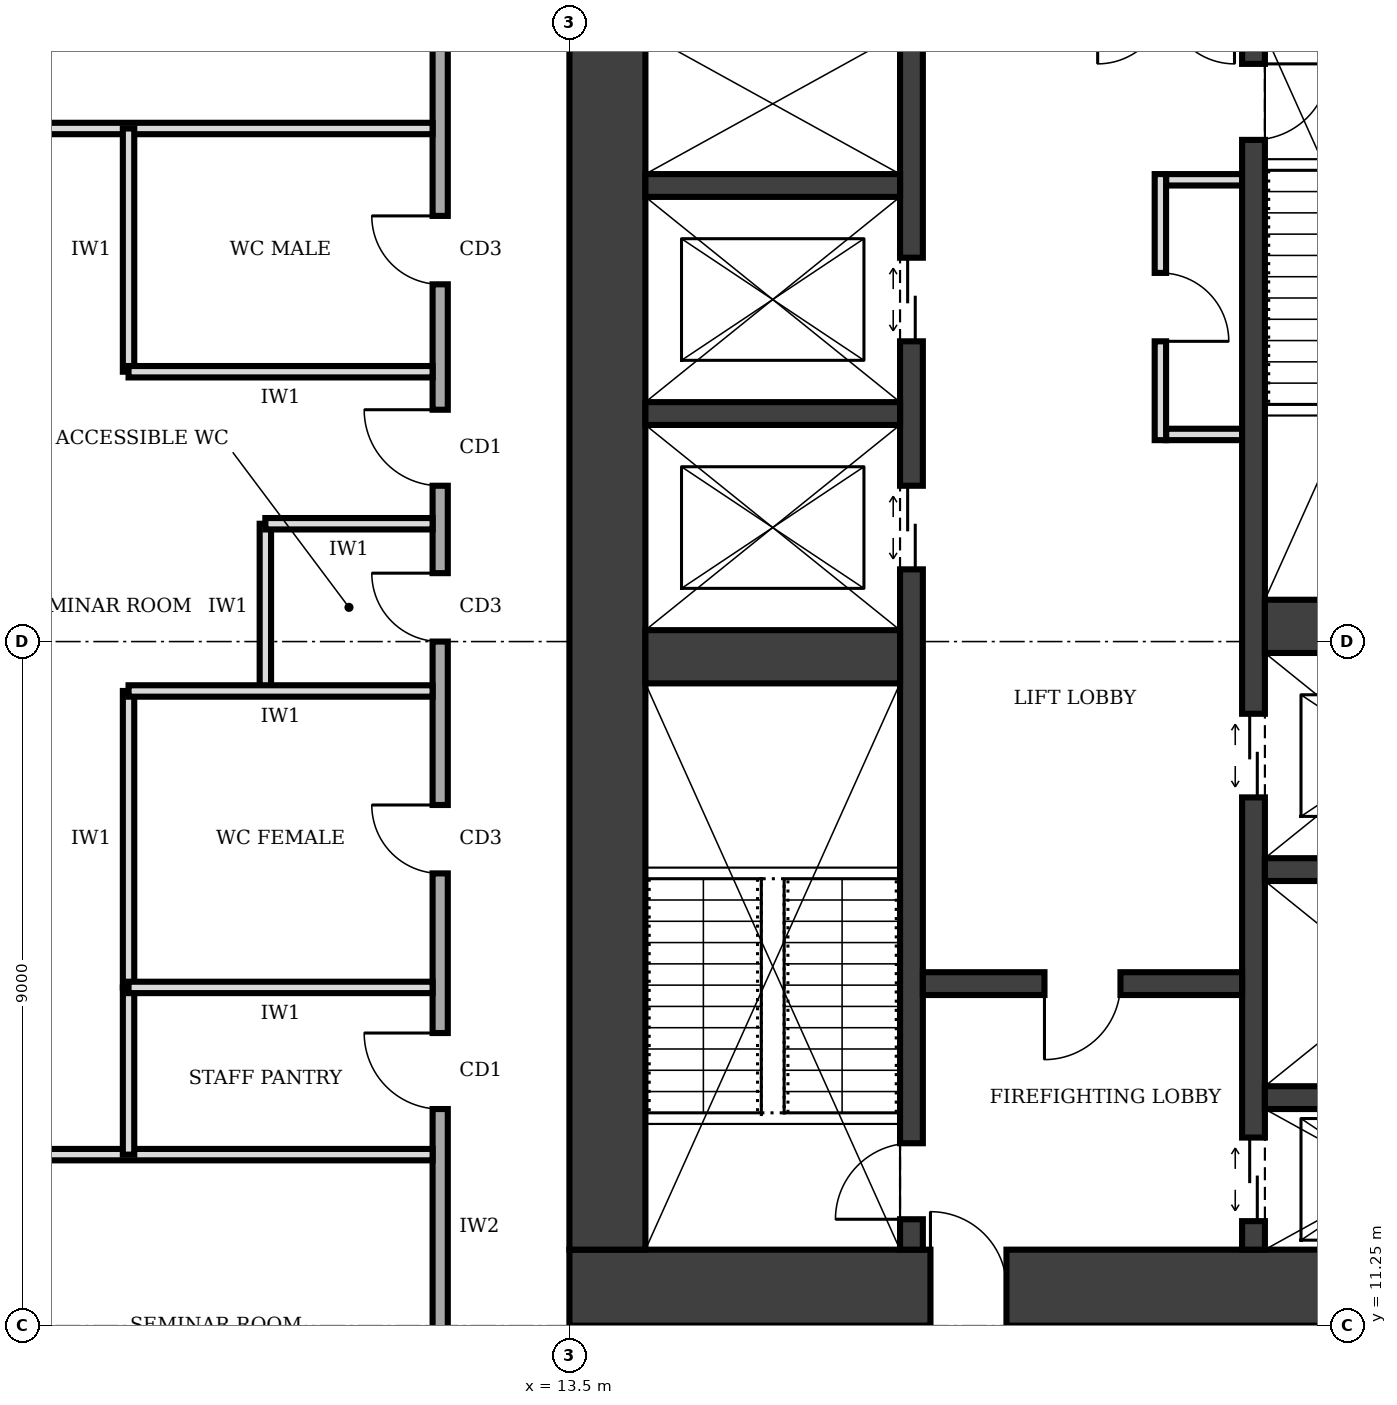
"""IFC4 building model, lengths in metres.
Left out: names, types, materials, properties, quantities, classifications, styles, units other than length and angle.
Written with IfcOpenShell. Run it as: python <this file> out.ifc"""

import sys

from ifc_helpers import new_model, si_unit, direction, frame, frame_2d, origin, place, context, subcontext, project, spatial, rectangle, extrude, element, fill, save


model = new_model("IFC4")
c1 = context("Model", 3, precision=1e-05, world=origin(), true_north=direction((0.0, 1.0)))
c2 = subcontext(c1, "Body", "Model", "MODEL_VIEW")
j1 = project(units=[si_unit("LENGTHUNIT", "METRE"), si_unit("PLANEANGLEUNIT", "RADIAN")], contexts=[c1])
p1 = place(None, origin())
s1 = spatial("IfcSite", under=j1, at=p1, CompositionType="ELEMENT")
p2 = place(p1, origin())
s2 = spatial("IfcBuilding", under=s1, at=p2, CompositionType="ELEMENT")
p3 = place(p2, frame((0.0, 0.0, 29.0)))
s3 = spatial("IfcBuildingStorey", under=s2, at=p3, CompositionType="ELEMENT", Elevation=29.0)
p4 = place(p3, frame((13.5, 11.75, 0.0), z_axis=(0.0, 0.0, 1.0), x_axis=(1.0, 0.0, 0.0)))
e1 = element("IfcWall", 1, at=p4, inside=s3, PredefinedType="SHEAR", context=c2, shape_type="SweptSolid", body=[
    extrude(rectangle(XDim=13.5, YDim=1.0, at=frame_2d((6.75, 0.0))), origin(), (0.0, 0.0, 1.0), 4.0),
])
p5 = place(p4, frame((4.75, 0.0, 0.0)))
e2 = element("IfcOpeningElement", 2, at=p5, cuts=e1, PredefinedType="OPENING", context=c2, shape_type="SweptSolid", body=[
    extrude(rectangle(XDim=1.0, YDim=2.1, at=frame_2d((0.5, 1.05))), frame((0.0, 0.51, 0.0), z_axis=(0.0, -1.0, 0.0), x_axis=(1.0, 0.0, 0.0)), (0.0, 0.0, 1.0), 1.02),
])
p6 = place(p3, frame((14.0, 28.25, 0.0), z_axis=(0.0, 0.0, 1.0), x_axis=(0.0, -1.0, 0.0)))
e3 = element("IfcWall", 3, at=p6, inside=s3, PredefinedType="SHEAR", context=c2, shape_type="SweptSolid", body=[
    extrude(rectangle(XDim=16.0, YDim=1.0, at=frame_2d((8.0, 0.0))), origin(), (0.0, 0.0, 1.0), 4.0),
])
p7 = place(p3, frame((18.0, 12.25, 0.0), z_axis=(0.0, 0.0, 1.0), x_axis=(0.0, 1.0, 0.0)))
e4 = element("IfcWall", 4, at=p7, inside=s3, PredefinedType="SHEAR", context=c2, shape_type="SweptSolid", body=[
    extrude(rectangle(XDim=16.0, YDim=0.3, at=frame_2d((8.0, 0.0))), origin(), (0.0, 0.0, 1.0), 4.0),
])
p8 = place(p7, frame((0.4, 0.0, 0.0)))
e5 = element("IfcOpeningElement", 5, at=p8, cuts=e4, PredefinedType="OPENING", context=c2, shape_type="SweptSolid", body=[
    extrude(rectangle(XDim=1.0, YDim=2.1, at=frame_2d((0.5, 1.05))), frame((0.0, 0.16, 0.0), z_axis=(0.0, -1.0, 0.0), x_axis=(1.0, 0.0, 0.0)), (0.0, 0.0, 1.0), 0.32),
])
p9 = place(p7, frame((8.95, 0.0, 0.0)))
e6 = element("IfcOpeningElement", 6, at=p9, cuts=e4, PredefinedType="OPENING", context=c2, shape_type="SweptSolid", body=[
    extrude(rectangle(XDim=1.1, YDim=2.1, at=frame_2d((0.55, 1.05))), frame((0.0, 0.16, 0.0), z_axis=(0.0, -1.0, 0.0), x_axis=(1.0, 0.0, 0.0)), (0.0, 0.0, 1.0), 0.32),
])
p10 = place(p7, frame((11.95, 0.0, 0.0)))
e7 = element("IfcOpeningElement", 7, at=p10, cuts=e4, PredefinedType="OPENING", context=c2, shape_type="SweptSolid", body=[
    extrude(rectangle(XDim=1.1, YDim=2.1, at=frame_2d((0.55, 1.05))), frame((0.0, 0.16, 0.0), z_axis=(0.0, -1.0, 0.0), x_axis=(1.0, 0.0, 0.0)), (0.0, 0.0, 1.0), 0.32),
])
p11 = place(p3, frame((22.5, 12.25, 0.0), z_axis=(0.0, 0.0, 1.0), x_axis=(0.0, 1.0, 0.0)))
e8 = element("IfcWall", 8, at=p11, inside=s3, PredefinedType="SHEAR", context=c2, shape_type="SweptSolid", body=[
    extrude(rectangle(XDim=16.0, YDim=0.3, at=frame_2d((8.0, 0.0))), origin(), (0.0, 0.0, 1.0), 4.0),
])
p12 = place(p11, frame((14.6, 0.0, 0.0)))
e9 = element("IfcOpeningElement", 9, at=p12, cuts=e8, PredefinedType="OPENING", context=c2, shape_type="SweptSolid", body=[
    extrude(rectangle(XDim=1.0, YDim=2.1, at=frame_2d((0.5, 1.05))), frame((0.0, 0.16, 0.0), z_axis=(0.0, -1.0, 0.0), x_axis=(1.0, 0.0, 0.0)), (0.0, 0.0, 1.0), 0.32),
])
p13 = place(p11, frame((0.375, 0.0, 0.0)))
e10 = element("IfcOpeningElement", 10, at=p13, cuts=e8, PredefinedType="OPENING", context=c2, shape_type="SweptSolid", body=[
    extrude(rectangle(XDim=1.1, YDim=2.1, at=frame_2d((0.55, 1.05))), frame((0.0, 0.16, 0.0), z_axis=(0.0, -1.0, 0.0), x_axis=(1.0, 0.0, 0.0)), (0.0, 0.0, 1.0), 0.32),
])
p14 = place(p11, frame((5.95, 0.0, 0.0)))
e11 = element("IfcOpeningElement", 11, at=p14, cuts=e8, PredefinedType="OPENING", context=c2, shape_type="SweptSolid", body=[
    extrude(rectangle(XDim=1.1, YDim=2.1, at=frame_2d((0.55, 1.05))), frame((0.0, 0.16, 0.0), z_axis=(0.0, -1.0, 0.0), x_axis=(1.0, 0.0, 0.0)), (0.0, 0.0, 1.0), 0.32),
])
p15 = place(p3, frame((14.5, 20.05, 0.0), z_axis=(0.0, 0.0, 1.0), x_axis=(1.0, 0.0, 0.0)))
e12 = element("IfcWall", 12, at=p15, inside=s3, PredefinedType="SHEAR", context=c2, shape_type="SweptSolid", body=[
    extrude(rectangle(XDim=3.35, YDim=0.7, at=frame_2d((1.675, 0.0))), origin(), (0.0, 0.0, 1.0), 4.0),
])
p16 = place(p3, frame((18.15, 15.75, 0.0), z_axis=(0.0, 0.0, 1.0), x_axis=(1.0, 0.0, 0.0)))
e13 = element("IfcWall", 13, at=p16, inside=s3, PredefinedType="SHEAR", context=c2, shape_type="SweptSolid", body=[
    extrude(rectangle(XDim=4.2, YDim=0.3, at=frame_2d((2.1, 0.0))), origin(), (0.0, 0.0, 1.0), 4.0),
])
p17 = place(p16, frame((1.6, 0.0, 0.0)))
e14 = element("IfcOpeningElement", 14, at=p17, cuts=e13, PredefinedType="OPENING", context=c2, shape_type="SweptSolid", body=[
    extrude(rectangle(XDim=1.0, YDim=2.1, at=frame_2d((0.5, 1.05))), frame((0.0, 0.16, 0.0), z_axis=(0.0, -1.0, 0.0), x_axis=(1.0, 0.0, 0.0)), (0.0, 0.0, 1.0), 0.32),
])
for number, where, z_axis, x_axis in (
    (15, (22.65, 14.25, 0.0), (0.0, 0.0, 1.0), (1.0, 0.0, 0.0)),
    (16, (22.65, 17.25, 0.0), (0.0, 0.0, 1.0), (1.0, 0.0, 0.0)),
):
    element("IfcWall", number, at=place(p3, frame(where, z_axis=z_axis, x_axis=x_axis)), inside=s3, PredefinedType="SHEAR", context=c2, shape_type="SweptSolid", body=[
        extrude(rectangle(XDim=3.35, YDim=0.3, at=frame_2d((1.675, 0.0))), origin(), (0.0, 0.0, 1.0), 4.0),
    ])
p18 = place(p3, frame((22.65, 20.45, 0.0), z_axis=(0.0, 0.0, 1.0), x_axis=(1.0, 0.0, 0.0)))
e17 = element("IfcWall", 17, at=p18, inside=s3, PredefinedType="SHEAR", context=c2, shape_type="SweptSolid", body=[
    extrude(rectangle(XDim=3.35, YDim=0.7, at=frame_2d((1.675, 0.0))), origin(), (0.0, 0.0, 1.0), 4.0),
])
for number, where, z_axis, x_axis in (
    (18, (14.5, 23.25, 0.0), (0.0, 0.0, 1.0), (1.0, 0.0, 0.0)),
    (19, (14.5, 26.25, 0.0), (0.0, 0.0, 1.0), (1.0, 0.0, 0.0)),
):
    element("IfcWall", number, at=place(p3, frame(where, z_axis=z_axis, x_axis=x_axis)), inside=s3, PredefinedType="SHEAR", context=c2, shape_type="SweptSolid", body=[
        extrude(rectangle(XDim=3.35, YDim=0.3, at=frame_2d((1.675, 0.0))), origin(), (0.0, 0.0, 1.0), 4.0),
    ])
p19 = place(p3, frame((21.275, 22.9, 0.0), z_axis=(0.0, 0.0, 1.0), x_axis=(0.0, 1.0, 0.0)))
e20 = element("IfcWall", 20, at=p19, inside=s3, PredefinedType="PARTITIONING", context=c2, shape_type="SweptSolid", body=[
    extrude(rectangle(XDim=3.5, YDim=0.15, at=frame_2d((1.75, 0.0))), origin(), (0.0, 0.0, 1.0), 3.75),
])
p20 = place(p19, frame((1.3, 0.0, 0.0)))
e21 = element("IfcOpeningElement", 21, at=p20, cuts=e20, PredefinedType="OPENING", context=c2, shape_type="SweptSolid", body=[
    extrude(rectangle(XDim=0.9, YDim=2.1, at=frame_2d((0.45, 1.05))), frame((0.0, 0.085, 0.0), z_axis=(0.0, -1.0, 0.0), x_axis=(1.0, 0.0, 0.0)), (0.0, 0.0, 1.0), 0.17),
])
for number, where, z_axis, x_axis in (
    (22, (21.35, 22.975, 0.0), (0.0, 0.0, 1.0), (1.0, 0.0, 0.0)),
    (23, (21.35, 26.325, 0.0), (0.0, 0.0, 1.0), (1.0, 0.0, 0.0)),
):
    element("IfcWall", number, at=place(p3, frame(where, z_axis=z_axis, x_axis=x_axis)), inside=s3, PredefinedType="PARTITIONING", context=c2, shape_type="SweptSolid", body=[
        extrude(rectangle(XDim=1.0, YDim=0.15, at=frame_2d((0.5, 0.0))), origin(), (0.0, 0.0, 1.0), 3.75),
    ])
p21 = place(p3, frame((11.8, 31.3, 0.0), z_axis=(0.0, 0.0, 1.0), x_axis=(0.0, -1.0, 0.0)))
e24 = element("IfcWall", 24, at=p21, inside=s3, PredefinedType="SOLIDWALL", context=c2, shape_type="SweptSolid", body=[
    extrude(rectangle(XDim=23.8, YDim=0.2, at=frame_2d((11.9, 0.0))), origin(), (0.0, 0.0, 1.0), 3.75),
])
p22 = place(p21, frame((20.3, 0.0, 0.0)))
e25 = element("IfcOpeningElement", 25, at=p22, cuts=e24, PredefinedType="OPENING", context=c2, shape_type="SweptSolid", body=[
    extrude(rectangle(XDim=1.0, YDim=2.1, at=frame_2d((0.5, 1.05))), frame((0.0, 0.11, 0.0), z_axis=(0.0, -1.0, 0.0), x_axis=(1.0, 0.0, 0.0)), (0.0, 0.0, 1.0), 0.22),
])
p23 = place(p21, frame((16.2, 0.0, 0.0)))
e26 = element("IfcOpeningElement", 26, at=p23, cuts=e24, PredefinedType="OPENING", context=c2, shape_type="SweptSolid", body=[
    extrude(rectangle(XDim=1.0, YDim=2.1, at=frame_2d((0.5, 1.05))), frame((0.0, 0.11, 0.0), z_axis=(0.0, -1.0, 0.0), x_axis=(1.0, 0.0, 0.0)), (0.0, 0.0, 1.0), 0.22),
])
p24 = place(p21, frame((13.2, 0.0, 0.0)))
e27 = element("IfcOpeningElement", 27, at=p24, cuts=e24, PredefinedType="OPENING", context=c2, shape_type="SweptSolid", body=[
    extrude(rectangle(XDim=0.9, YDim=2.1, at=frame_2d((0.45, 1.05))), frame((0.0, 0.11, 0.0), z_axis=(0.0, -1.0, 0.0), x_axis=(1.0, 0.0, 0.0)), (0.0, 0.0, 1.0), 0.22),
])
p25 = place(p21, frame((10.15, 0.0, 0.0)))
e28 = element("IfcOpeningElement", 28, at=p25, cuts=e24, PredefinedType="OPENING", context=c2, shape_type="SweptSolid", body=[
    extrude(rectangle(XDim=0.9, YDim=2.1, at=frame_2d((0.45, 1.05))), frame((0.0, 0.11, 0.0), z_axis=(0.0, -1.0, 0.0), x_axis=(1.0, 0.0, 0.0)), (0.0, 0.0, 1.0), 0.22),
])
p26 = place(p21, frame((5.45, 0.0, 0.0)))
e29 = element("IfcOpeningElement", 29, at=p26, cuts=e24, PredefinedType="OPENING", context=c2, shape_type="SweptSolid", body=[
    extrude(rectangle(XDim=0.9, YDim=2.1, at=frame_2d((0.45, 1.05))), frame((0.0, 0.11, 0.0), z_axis=(0.0, -1.0, 0.0), x_axis=(1.0, 0.0, 0.0)), (0.0, 0.0, 1.0), 0.22),
])
p27 = place(p21, frame((8.0, 0.0, 0.0)))
e30 = element("IfcOpeningElement", 30, at=p27, cuts=e24, PredefinedType="OPENING", context=c2, shape_type="SweptSolid", body=[
    extrude(rectangle(XDim=1.0, YDim=2.1, at=frame_2d((0.5, 1.05))), frame((0.0, 0.11, 0.0), z_axis=(0.0, -1.0, 0.0), x_axis=(1.0, 0.0, 0.0)), (0.0, 0.0, 1.0), 0.22),
])
p28 = place(p21, frame((1.55, 0.0, 0.0)))
e31 = element("IfcOpeningElement", 31, at=p28, cuts=e24, PredefinedType="OPENING", context=c2, shape_type="SweptSolid", body=[
    extrude(rectangle(XDim=1.0, YDim=2.1, at=frame_2d((0.5, 1.05))), frame((0.0, 0.11, 0.0), z_axis=(0.0, -1.0, 0.0), x_axis=(1.0, 0.0, 0.0)), (0.0, 0.0, 1.0), 0.22),
])
for number, where, z_axis, x_axis in (
    (32, (0.3, 13.5, 0.0), (0.0, 0.0, 1.0), (1.0, 0.0, 0.0)),
    (33, (0.3, 27.0, 0.0), (0.0, 0.0, 1.0), (1.0, 0.0, 0.0)),
):
    element("IfcWall", number, at=place(p3, frame(where, z_axis=z_axis, x_axis=x_axis)), inside=s3, PredefinedType="PARTITIONING", context=c2, shape_type="SweptSolid", body=[
        extrude(rectangle(XDim=11.4, YDim=0.15, at=frame_2d((5.7, 0.0))), origin(), (0.0, 0.0, 1.0), 3.75),
    ])
p29 = place(p3, frame((11.7, 15.7, 0.0), z_axis=(0.0, 0.0, 1.0), x_axis=(-1.0, 0.0, 0.0)))
e34 = element("IfcWall", 34, at=p29, inside=s3, PredefinedType="PARTITIONING", context=c2, shape_type="SweptSolid", body=[
    extrude(rectangle(XDim=4.0, YDim=0.15, at=frame_2d((2.0, 0.0))), origin(), (0.0, 0.0, 1.0), 3.75),
])
p30 = place(p3, frame((11.7, 19.6, 0.0), z_axis=(0.0, 0.0, 1.0), x_axis=(-1.0, 0.0, 0.0)))
e35 = element("IfcWall", 35, at=p30, inside=s3, PredefinedType="PARTITIONING", context=c2, shape_type="SweptSolid", body=[
    extrude(rectangle(XDim=4.0, YDim=0.15, at=frame_2d((2.0, 0.0))), origin(), (0.0, 0.0, 1.0), 2.85),
])
p31 = place(p3, frame((11.7, 21.8, 0.0), z_axis=(0.0, 0.0, 1.0), x_axis=(-1.0, 0.0, 0.0)))
e36 = element("IfcWall", 36, at=p31, inside=s3, PredefinedType="PARTITIONING", context=c2, shape_type="SweptSolid", body=[
    extrude(rectangle(XDim=2.2, YDim=0.15, at=frame_2d((1.1, 0.0))), origin(), (0.0, 0.0, 1.0), 3.75),
])
p32 = place(p3, frame((11.7, 23.8, 0.0), z_axis=(0.0, 0.0, 1.0), x_axis=(-1.0, 0.0, 0.0)))
e37 = element("IfcWall", 37, at=p32, inside=s3, PredefinedType="PARTITIONING", context=c2, shape_type="SweptSolid", body=[
    extrude(rectangle(XDim=4.0, YDim=0.15, at=frame_2d((2.0, 0.0))), origin(), (0.0, 0.0, 1.0), 3.75),
])
p33 = place(p3, frame((7.7, 13.5, 0.0), z_axis=(0.0, 0.0, 1.0), x_axis=(0.0, 1.0, 0.0)))
e38 = element("IfcWall", 38, at=p33, inside=s3, PredefinedType="PARTITIONING", context=c2, shape_type="SweptSolid", body=[
    extrude(rectangle(XDim=2.2, YDim=0.15, at=frame_2d((1.1, 0.0))), origin(), (0.0, 0.0, 1.0), 3.75),
])
p34 = place(p3, frame((7.7, 15.7, 0.0), z_axis=(0.0, 0.0, 1.0), x_axis=(0.0, 1.0, 0.0)))
e39 = element("IfcWall", 39, at=p34, inside=s3, PredefinedType="PARTITIONING", context=c2, shape_type="SweptSolid", body=[
    extrude(rectangle(XDim=3.9, YDim=0.15, at=frame_2d((1.95, 0.0))), origin(), (0.0, 0.0, 1.0), 3.75),
])
p35 = place(p3, frame((9.5, 19.6, 0.0), z_axis=(0.0, 0.0, 1.0), x_axis=(0.0, 1.0, 0.0)))
e40 = element("IfcWall", 40, at=p35, inside=s3, PredefinedType="PARTITIONING", context=c2, shape_type="SweptSolid", body=[
    extrude(rectangle(XDim=2.2, YDim=0.15, at=frame_2d((1.1, 0.0))), origin(), (0.0, 0.0, 1.0), 3.75),
])
p36 = place(p3, frame((7.7, 23.8, 0.0), z_axis=(0.0, 0.0, 1.0), x_axis=(0.0, 1.0, 0.0)))
e41 = element("IfcWall", 41, at=p36, inside=s3, PredefinedType="PARTITIONING", context=c2, shape_type="SweptSolid", body=[
    extrude(rectangle(XDim=3.2, YDim=0.15, at=frame_2d((1.6, 0.0))), origin(), (0.0, 0.0, 1.0), 3.75),
])
p37 = place(p5, origin())
e42 = element("IfcDoor", 42, at=p37, inside=s3, OperationType="SINGLE_SWING_LEFT", PredefinedType="DOOR", context=c2, shape_type="SweptSolid", body=[
    extrude(rectangle(XDim=1.0, YDim=2.1, at=frame_2d((0.5, 1.05))), frame((0.0, 0.025, 0.0), z_axis=(0.0, -1.0, 0.0), x_axis=(1.0, 0.0, 0.0)), (0.0, 0.0, 1.0), 0.05),
])
fill(e2, e42)
p38 = place(p17, frame((1.0, 0.0, 0.0), z_axis=(0.0, 0.0, 1.0), x_axis=(-1.0, 0.0, 0.0)))
e43 = element("IfcDoor", 43, at=p38, inside=s3, OperationType="SINGLE_SWING_RIGHT", PredefinedType="DOOR", context=c2, shape_type="SweptSolid", body=[
    extrude(rectangle(XDim=1.0, YDim=2.1, at=frame_2d((0.5, 1.05))), frame((0.0, 0.025, 0.0), z_axis=(0.0, -1.0, 0.0), x_axis=(1.0, 0.0, 0.0)), (0.0, 0.0, 1.0), 0.05),
])
fill(e14, e43)
p39 = place(p8, origin())
e44 = element("IfcDoor", 44, at=p39, inside=s3, OperationType="SINGLE_SWING_LEFT", PredefinedType="DOOR", context=c2, shape_type="SweptSolid", body=[
    extrude(rectangle(XDim=1.0, YDim=2.1, at=frame_2d((0.5, 1.05))), frame((0.0, 0.025, 0.0), z_axis=(0.0, -1.0, 0.0), x_axis=(1.0, 0.0, 0.0)), (0.0, 0.0, 1.0), 0.05),
])
fill(e5, e44)
p40 = place(p12, frame((1.0, 0.0, 0.0), z_axis=(0.0, 0.0, 1.0), x_axis=(-1.0, 0.0, 0.0)))
e45 = element("IfcDoor", 45, at=p40, inside=s3, OperationType="SINGLE_SWING_LEFT", PredefinedType="DOOR", context=c2, shape_type="SweptSolid", body=[
    extrude(rectangle(XDim=1.0, YDim=2.1, at=frame_2d((0.5, 1.05))), frame((0.0, 0.025, 0.0), z_axis=(0.0, -1.0, 0.0), x_axis=(1.0, 0.0, 0.0)), (0.0, 0.0, 1.0), 0.05),
])
fill(e9, e45)
p41 = place(p13, origin())
e46 = element("IfcDoor", 46, at=p41, inside=s3, OperationType="DOUBLE_DOOR_SLIDING", PredefinedType="DOOR", context=c2, shape_type="SweptSolid", body=[
    extrude(rectangle(XDim=1.1, YDim=2.1, at=frame_2d((0.55, 1.05))), frame((0.0, 0.025, 0.0), z_axis=(0.0, -1.0, 0.0), x_axis=(1.0, 0.0, 0.0)), (0.0, 0.0, 1.0), 0.05),
])
fill(e10, e46)
p42 = place(p9, origin())
e47 = element("IfcDoor", 47, at=p42, inside=s3, OperationType="DOUBLE_DOOR_SLIDING", PredefinedType="DOOR", context=c2, shape_type="SweptSolid", body=[
    extrude(rectangle(XDim=1.1, YDim=2.1, at=frame_2d((0.55, 1.05))), frame((0.0, 0.025, 0.0), z_axis=(0.0, -1.0, 0.0), x_axis=(1.0, 0.0, 0.0)), (0.0, 0.0, 1.0), 0.05),
])
fill(e6, e47)
p43 = place(p10, origin())
e48 = element("IfcDoor", 48, at=p43, inside=s3, OperationType="DOUBLE_DOOR_SLIDING", PredefinedType="DOOR", context=c2, shape_type="SweptSolid", body=[
    extrude(rectangle(XDim=1.1, YDim=2.1, at=frame_2d((0.55, 1.05))), frame((0.0, 0.025, 0.0), z_axis=(0.0, -1.0, 0.0), x_axis=(1.0, 0.0, 0.0)), (0.0, 0.0, 1.0), 0.05),
])
fill(e7, e48)
p44 = place(p14, origin())
e49 = element("IfcDoor", 49, at=p44, inside=s3, OperationType="DOUBLE_DOOR_SLIDING", PredefinedType="DOOR", context=c2, shape_type="SweptSolid", body=[
    extrude(rectangle(XDim=1.1, YDim=2.1, at=frame_2d((0.55, 1.05))), frame((0.0, 0.025, 0.0), z_axis=(0.0, -1.0, 0.0), x_axis=(1.0, 0.0, 0.0)), (0.0, 0.0, 1.0), 0.05),
])
fill(e11, e49)
p45 = place(p20, frame((0.9, 0.0, 0.0), z_axis=(0.0, 0.0, 1.0), x_axis=(-1.0, 0.0, 0.0)))
e50 = element("IfcDoor", 50, at=p45, inside=s3, OperationType="SINGLE_SWING_RIGHT", PredefinedType="DOOR", context=c2, shape_type="SweptSolid", body=[
    extrude(rectangle(XDim=0.9, YDim=2.1, at=frame_2d((0.45, 1.05))), frame((0.0, 0.025, 0.0), z_axis=(0.0, -1.0, 0.0), x_axis=(1.0, 0.0, 0.0)), (0.0, 0.0, 1.0), 0.05),
])
fill(e21, e50)
p46 = place(p23, frame((1.0, 0.0, 0.0), z_axis=(0.0, 0.0, 1.0), x_axis=(-1.0, 0.0, 0.0)))
e51 = element("IfcDoor", 51, at=p46, inside=s3, OperationType="SINGLE_SWING_RIGHT", PredefinedType="DOOR", context=c2, shape_type="SweptSolid", body=[
    extrude(rectangle(XDim=1.0, YDim=2.1, at=frame_2d((0.5, 1.05))), frame((0.0, 0.025, 0.0), z_axis=(0.0, -1.0, 0.0), x_axis=(1.0, 0.0, 0.0)), (0.0, 0.0, 1.0), 0.05),
])
fill(e26, e51)
p47 = place(p24, frame((0.9, 0.0, 0.0), z_axis=(0.0, 0.0, 1.0), x_axis=(-1.0, 0.0, 0.0)))
e52 = element("IfcDoor", 52, at=p47, inside=s3, OperationType="SINGLE_SWING_RIGHT", PredefinedType="DOOR", context=c2, shape_type="SweptSolid", body=[
    extrude(rectangle(XDim=0.9, YDim=2.1, at=frame_2d((0.45, 1.05))), frame((0.0, 0.025, 0.0), z_axis=(0.0, -1.0, 0.0), x_axis=(1.0, 0.0, 0.0)), (0.0, 0.0, 1.0), 0.05),
])
fill(e27, e52)
p48 = place(p25, frame((0.9, 0.0, 0.0), z_axis=(0.0, 0.0, 1.0), x_axis=(-1.0, 0.0, 0.0)))
e53 = element("IfcDoor", 53, at=p48, inside=s3, OperationType="SINGLE_SWING_RIGHT", PredefinedType="DOOR", context=c2, shape_type="SweptSolid", body=[
    extrude(rectangle(XDim=0.9, YDim=2.1, at=frame_2d((0.45, 1.05))), frame((0.0, 0.025, 0.0), z_axis=(0.0, -1.0, 0.0), x_axis=(1.0, 0.0, 0.0)), (0.0, 0.0, 1.0), 0.05),
])
fill(e28, e53)
p49 = place(p26, frame((0.9, 0.0, 0.0), z_axis=(0.0, 0.0, 1.0), x_axis=(-1.0, 0.0, 0.0)))
e54 = element("IfcDoor", 54, at=p49, inside=s3, OperationType="SINGLE_SWING_RIGHT", PredefinedType="DOOR", context=c2, shape_type="SweptSolid", body=[
    extrude(rectangle(XDim=0.9, YDim=2.1, at=frame_2d((0.45, 1.05))), frame((0.0, 0.025, 0.0), z_axis=(0.0, -1.0, 0.0), x_axis=(1.0, 0.0, 0.0)), (0.0, 0.0, 1.0), 0.05),
])
fill(e29, e54)
p50 = place(p27, frame((1.0, 0.0, 0.0), z_axis=(0.0, 0.0, 1.0), x_axis=(-1.0, 0.0, 0.0)))
e55 = element("IfcDoor", 55, at=p50, inside=s3, OperationType="SINGLE_SWING_RIGHT", PredefinedType="DOOR", context=c2, shape_type="SweptSolid", body=[
    extrude(rectangle(XDim=1.0, YDim=2.1, at=frame_2d((0.5, 1.05))), frame((0.0, 0.025, 0.0), z_axis=(0.0, -1.0, 0.0), x_axis=(1.0, 0.0, 0.0)), (0.0, 0.0, 1.0), 0.05),
])
fill(e30, e55)
save(model, sys.argv[1])
